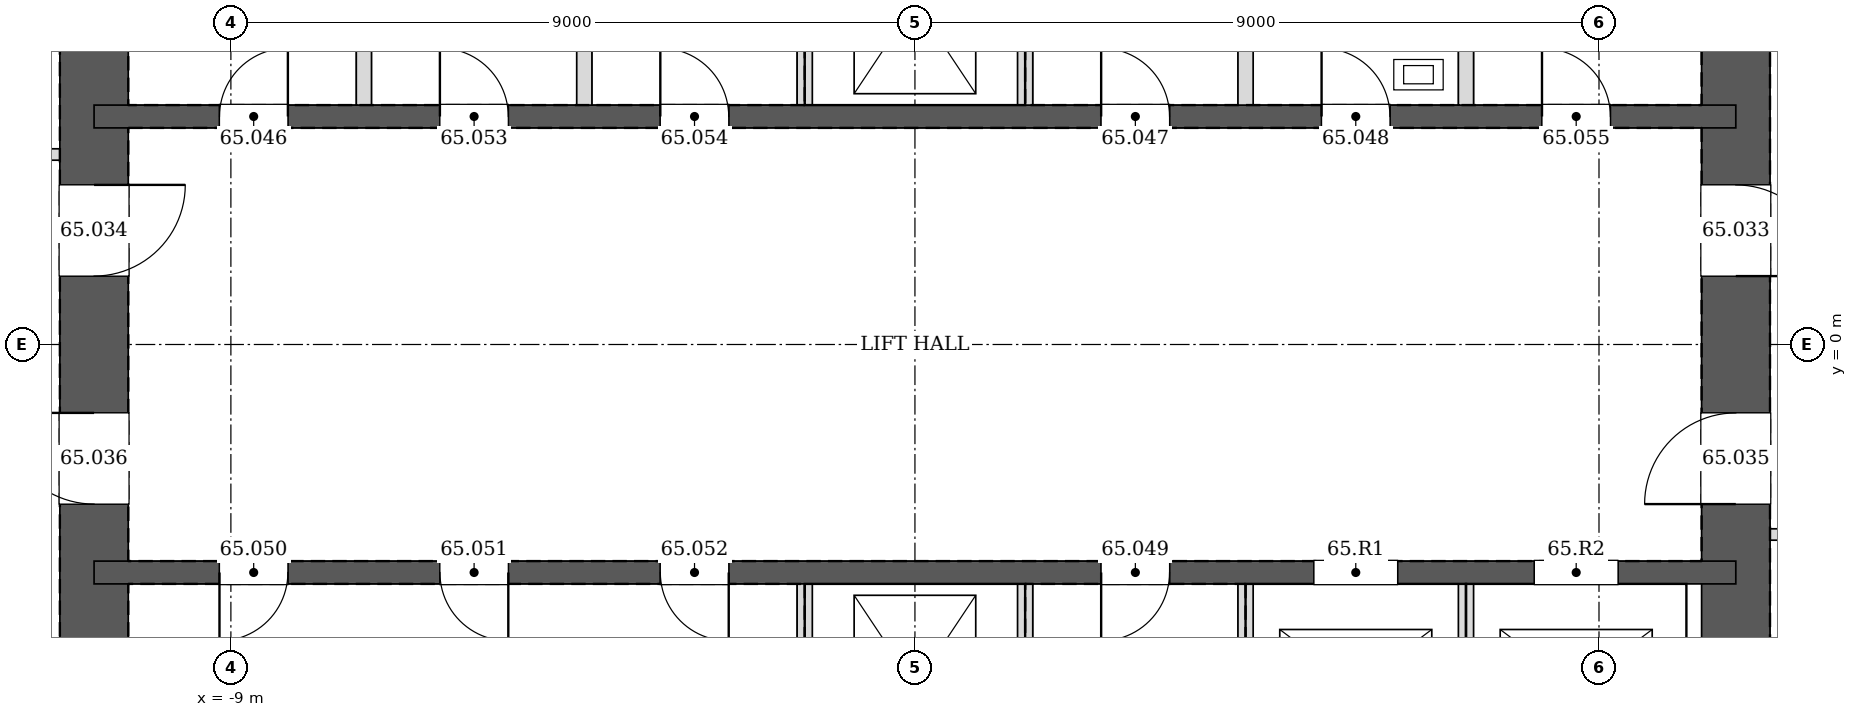
"""IFC4 building model, lengths in metres.
Left out: names, types, materials, properties, quantities, classifications, styles, units other than length and angle.
Written with IfcOpenShell. Run it as: python <this file> out.ifc"""

import sys

from ifc_helpers import new_model, si_unit, direction, frame, frame_2d, origin, place, context, subcontext, project, spatial, rectangle, extrude, element, fill, save


model = new_model("IFC4")
c1 = context("Model", 3, precision=1e-05, world=origin(), true_north=direction((0.0, 1.0)))
c2 = subcontext(c1, "Body", "Model", "MODEL_VIEW")
j1 = project(units=[si_unit("LENGTHUNIT", "METRE"), si_unit("PLANEANGLEUNIT", "RADIAN")], contexts=[c1])
p1 = place(None, origin())
s1 = spatial("IfcSite", under=j1, at=p1, CompositionType="ELEMENT")
p2 = place(p1, origin())
s2 = spatial("IfcBuilding", under=s1, at=p2, CompositionType="ELEMENT")
p3 = place(p2, frame((0.0, 0.0, 270.8)))
s3 = spatial("IfcBuildingStorey", under=s2, at=p3, CompositionType="ELEMENT", Elevation=270.8)
p4 = place(p3, frame((10.8, -10.8, 0.0), z_axis=(0.0, 0.0, 1.0), x_axis=(0.0, 1.0, 0.0)))
e1 = element("IfcWall", 1, at=p4, inside=s3, PredefinedType="SOLIDWALL", context=c2, shape_type="SweptSolid", body=[
    extrude(rectangle(XDim=21.6, YDim=0.9, at=frame_2d((10.8, 0.0))), origin(), (0.0, 0.0, 1.0), 3.4),
])
p5 = place(p4, frame((11.7, 0.0, 0.0)))
e2 = element("IfcOpeningElement", 2, at=p5, cuts=e1, PredefinedType="OPENING", context=c2, shape_type="SweptSolid", body=[
    extrude(rectangle(XDim=1.2, YDim=2.1, at=frame_2d((0.6, 1.05))), frame((0.0, 0.46, 0.0), z_axis=(0.0, -1.0, 0.0), x_axis=(1.0, 0.0, 0.0)), (0.0, 0.0, 1.0), 0.92),
])
p6 = place(p4, frame((8.7, 0.0, 0.0)))
e3 = element("IfcOpeningElement", 3, at=p6, cuts=e1, PredefinedType="OPENING", context=c2, shape_type="SweptSolid", body=[
    extrude(rectangle(XDim=1.2, YDim=2.1, at=frame_2d((0.6, 1.05))), frame((0.0, 0.46, 0.0), z_axis=(0.0, -1.0, 0.0), x_axis=(1.0, 0.0, 0.0)), (0.0, 0.0, 1.0), 0.92),
])
p7 = place(p3, frame((-10.8, 10.8, 0.0), z_axis=(0.0, 0.0, 1.0), x_axis=(0.0, -1.0, 0.0)))
e4 = element("IfcWall", 4, at=p7, inside=s3, PredefinedType="SOLIDWALL", context=c2, shape_type="SweptSolid", body=[
    extrude(rectangle(XDim=21.6, YDim=0.9, at=frame_2d((10.8, 0.0))), origin(), (0.0, 0.0, 1.0), 3.4),
])
p8 = place(p7, frame((8.7, 0.0, 0.0)))
e5 = element("IfcOpeningElement", 5, at=p8, cuts=e4, PredefinedType="OPENING", context=c2, shape_type="SweptSolid", body=[
    extrude(rectangle(XDim=1.2, YDim=2.1, at=frame_2d((0.6, 1.05))), frame((0.0, 0.46, 0.0), z_axis=(0.0, -1.0, 0.0), x_axis=(1.0, 0.0, 0.0)), (0.0, 0.0, 1.0), 0.92),
])
p9 = place(p7, frame((11.7, 0.0, 0.0)))
e6 = element("IfcOpeningElement", 6, at=p9, cuts=e4, PredefinedType="OPENING", context=c2, shape_type="SweptSolid", body=[
    extrude(rectangle(XDim=1.2, YDim=2.1, at=frame_2d((0.6, 1.05))), frame((0.0, 0.46, 0.0), z_axis=(0.0, -1.0, 0.0), x_axis=(1.0, 0.0, 0.0)), (0.0, 0.0, 1.0), 0.92),
])
p10 = place(p3, frame((-10.8, 3.0, 0.0), z_axis=(0.0, 0.0, 1.0), x_axis=(1.0, 0.0, 0.0)))
e7 = element("IfcWall", 7, at=p10, inside=s3, PredefinedType="SOLIDWALL", context=c2, shape_type="SweptSolid", body=[
    extrude(rectangle(XDim=21.6, YDim=0.3, at=frame_2d((10.8, 0.0))), origin(), (0.0, 0.0, 1.0), 3.4),
])
p11 = place(p10, frame((1.65, 0.0, 0.0)))
e8 = element("IfcOpeningElement", 8, at=p11, cuts=e7, PredefinedType="OPENING", context=c2, shape_type="SweptSolid", body=[
    extrude(rectangle(XDim=0.9, YDim=2.1, at=frame_2d((0.45, 1.05))), frame((0.0, 0.16, 0.0), z_axis=(0.0, -1.0, 0.0), x_axis=(1.0, 0.0, 0.0)), (0.0, 0.0, 1.0), 0.32),
])
p12 = place(p10, frame((13.25, 0.0, 0.0)))
e9 = element("IfcOpeningElement", 9, at=p12, cuts=e7, PredefinedType="OPENING", context=c2, shape_type="SweptSolid", body=[
    extrude(rectangle(XDim=0.9, YDim=2.1, at=frame_2d((0.45, 1.05))), frame((0.0, 0.16, 0.0), z_axis=(0.0, -1.0, 0.0), x_axis=(1.0, 0.0, 0.0)), (0.0, 0.0, 1.0), 0.32),
])
p13 = place(p10, frame((16.15, 0.0, 0.0)))
e10 = element("IfcOpeningElement", 10, at=p13, cuts=e7, PredefinedType="OPENING", context=c2, shape_type="SweptSolid", body=[
    extrude(rectangle(XDim=0.9, YDim=2.1, at=frame_2d((0.45, 1.05))), frame((0.0, 0.16, 0.0), z_axis=(0.0, -1.0, 0.0), x_axis=(1.0, 0.0, 0.0)), (0.0, 0.0, 1.0), 0.32),
])
p14 = place(p10, frame((4.55, 0.0, 0.0)))
e11 = element("IfcOpeningElement", 11, at=p14, cuts=e7, PredefinedType="OPENING", context=c2, shape_type="SweptSolid", body=[
    extrude(rectangle(XDim=0.9, YDim=2.1, at=frame_2d((0.45, 1.05))), frame((0.0, 0.16, 0.0), z_axis=(0.0, -1.0, 0.0), x_axis=(1.0, 0.0, 0.0)), (0.0, 0.0, 1.0), 0.32),
])
p15 = place(p10, frame((7.45, 0.0, 0.0)))
e12 = element("IfcOpeningElement", 12, at=p15, cuts=e7, PredefinedType="OPENING", context=c2, shape_type="SweptSolid", body=[
    extrude(rectangle(XDim=0.9, YDim=2.1, at=frame_2d((0.45, 1.05))), frame((0.0, 0.16, 0.0), z_axis=(0.0, -1.0, 0.0), x_axis=(1.0, 0.0, 0.0)), (0.0, 0.0, 1.0), 0.32),
])
p16 = place(p10, frame((19.05, 0.0, 0.0)))
e13 = element("IfcOpeningElement", 13, at=p16, cuts=e7, PredefinedType="OPENING", context=c2, shape_type="SweptSolid", body=[
    extrude(rectangle(XDim=0.9, YDim=2.1, at=frame_2d((0.45, 1.05))), frame((0.0, 0.16, 0.0), z_axis=(0.0, -1.0, 0.0), x_axis=(1.0, 0.0, 0.0)), (0.0, 0.0, 1.0), 0.32),
])
p17 = place(p3, frame((-10.8, -3.0, 0.0), z_axis=(0.0, 0.0, 1.0), x_axis=(1.0, 0.0, 0.0)))
e14 = element("IfcWall", 14, at=p17, inside=s3, PredefinedType="SOLIDWALL", context=c2, shape_type="SweptSolid", body=[
    extrude(rectangle(XDim=21.6, YDim=0.3, at=frame_2d((10.8, 0.0))), origin(), (0.0, 0.0, 1.0), 3.4),
])
p18 = place(p17, frame((13.25, 0.0, 0.0)))
e15 = element("IfcOpeningElement", 15, at=p18, cuts=e14, PredefinedType="OPENING", context=c2, shape_type="SweptSolid", body=[
    extrude(rectangle(XDim=0.9, YDim=2.1, at=frame_2d((0.45, 1.05))), frame((0.0, 0.16, 0.0), z_axis=(0.0, -1.0, 0.0), x_axis=(1.0, 0.0, 0.0)), (0.0, 0.0, 1.0), 0.32),
])
p19 = place(p17, frame((1.65, 0.0, 0.0)))
e16 = element("IfcOpeningElement", 16, at=p19, cuts=e14, PredefinedType="OPENING", context=c2, shape_type="SweptSolid", body=[
    extrude(rectangle(XDim=0.9, YDim=2.1, at=frame_2d((0.45, 1.05))), frame((0.0, 0.16, 0.0), z_axis=(0.0, -1.0, 0.0), x_axis=(1.0, 0.0, 0.0)), (0.0, 0.0, 1.0), 0.32),
])
p20 = place(p17, frame((4.55, 0.0, 0.0)))
e17 = element("IfcOpeningElement", 17, at=p20, cuts=e14, PredefinedType="OPENING", context=c2, shape_type="SweptSolid", body=[
    extrude(rectangle(XDim=0.9, YDim=2.1, at=frame_2d((0.45, 1.05))), frame((0.0, 0.16, 0.0), z_axis=(0.0, -1.0, 0.0), x_axis=(1.0, 0.0, 0.0)), (0.0, 0.0, 1.0), 0.32),
])
p21 = place(p17, frame((7.45, 0.0, 0.0)))
e18 = element("IfcOpeningElement", 18, at=p21, cuts=e14, PredefinedType="OPENING", context=c2, shape_type="SweptSolid", body=[
    extrude(rectangle(XDim=0.9, YDim=2.1, at=frame_2d((0.45, 1.05))), frame((0.0, 0.16, 0.0), z_axis=(0.0, -1.0, 0.0), x_axis=(1.0, 0.0, 0.0)), (0.0, 0.0, 1.0), 0.32),
])
p22 = place(p17, frame((16.05, 0.0, 0.0)))
e19 = element("IfcOpeningElement", 19, at=p22, cuts=e14, PredefinedType="OPENING", context=c2, shape_type="SweptSolid", body=[
    extrude(rectangle(XDim=1.1, YDim=2.1, at=frame_2d((0.55, 1.05))), frame((0.0, 0.16, 0.0), z_axis=(0.0, -1.0, 0.0), x_axis=(1.0, 0.0, 0.0)), (0.0, 0.0, 1.0), 0.32),
])
p23 = place(p17, frame((18.95, 0.0, 0.0)))
e20 = element("IfcOpeningElement", 20, at=p23, cuts=e14, PredefinedType="OPENING", context=c2, shape_type="SweptSolid", body=[
    extrude(rectangle(XDim=1.1, YDim=2.1, at=frame_2d((0.55, 1.05))), frame((0.0, 0.16, 0.0), z_axis=(0.0, -1.0, 0.0), x_axis=(1.0, 0.0, 0.0)), (0.0, 0.0, 1.0), 0.32),
])
p24 = place(p3, frame((11.25, -2.5, 0.0), z_axis=(0.0, 0.0, 1.0), x_axis=(1.0, 0.0, 0.0)))
e21 = element("IfcWall", 21, at=p24, inside=s3, PredefinedType="PARTITIONING", context=c2, shape_type="SweptSolid", body=[
    extrude(rectangle(XDim=1.8, YDim=0.15, at=frame_2d((0.9, 0.0))), origin(), (0.0, 0.0, 1.0), 3.2),
])
p25 = place(p24, frame((0.425, 0.0, 0.0)))
e22 = element("IfcOpeningElement", 22, at=p25, cuts=e21, PredefinedType="OPENING", context=c2, shape_type="SweptSolid", body=[
    extrude(rectangle(XDim=0.95, YDim=2.1, at=frame_2d((0.475, 1.05))), frame((0.0, 0.085, 0.0), z_axis=(0.0, -1.0, 0.0), x_axis=(1.0, 0.0, 0.0)), (0.0, 0.0, 1.0), 0.17),
])
p26 = place(p3, frame((-11.25, 2.5, 0.0), z_axis=(0.0, 0.0, 1.0), x_axis=(-1.0, 0.0, 0.0)))
e23 = element("IfcWall", 23, at=p26, inside=s3, PredefinedType="PARTITIONING", context=c2, shape_type="SweptSolid", body=[
    extrude(rectangle(XDim=1.8, YDim=0.15, at=frame_2d((0.9, 0.0))), origin(), (0.0, 0.0, 1.0), 3.2),
])
p27 = place(p26, frame((0.425, 0.0, 0.0)))
e24 = element("IfcOpeningElement", 24, at=p27, cuts=e23, PredefinedType="OPENING", context=c2, shape_type="SweptSolid", body=[
    extrude(rectangle(XDim=0.95, YDim=2.1, at=frame_2d((0.475, 1.05))), frame((0.0, 0.085, 0.0), z_axis=(0.0, -1.0, 0.0), x_axis=(1.0, 0.0, 0.0)), (0.0, 0.0, 1.0), 0.17),
])
for number, where, z_axis, x_axis in (
    (25, (-7.25, 3.15, 0.0), (0.0, 0.0, 1.0), (0.0, 1.0, 0.0)),
    (26, (-4.35, 3.15, 0.0), (0.0, 0.0, 1.0), (0.0, 1.0, 0.0)),
    (27, (-1.45, 3.15, 0.0), (0.0, 0.0, 1.0), (0.0, 1.0, 0.0)),
    (28, (1.45, 3.15, 0.0), (0.0, 0.0, 1.0), (0.0, 1.0, 0.0)),
    (29, (4.35, 3.15, 0.0), (0.0, 0.0, 1.0), (0.0, 1.0, 0.0)),
    (30, (7.25, 3.15, 0.0), (0.0, 0.0, 1.0), (0.0, 1.0, 0.0)),
    (31, (-1.45, -5.85, 0.0), (0.0, 0.0, 1.0), (0.0, 1.0, 0.0)),
    (32, (1.45, -5.85, 0.0), (0.0, 0.0, 1.0), (0.0, 1.0, 0.0)),
    (33, (4.35, -5.85, 0.0), (0.0, 0.0, 1.0), (0.0, 1.0, 0.0)),
):
    element("IfcWall", number, at=place(p3, frame(where, z_axis=z_axis, x_axis=x_axis)), inside=s3, PredefinedType="PARTITIONING", context=c2, shape_type="SweptSolid", body=[
        extrude(rectangle(XDim=2.7, YDim=0.2, at=frame_2d((1.35, 0.0))), origin(), (0.0, 0.0, 1.0), 3.2),
    ])
p28 = place(p3, frame((7.25, -5.85, 0.0), z_axis=(0.0, 0.0, 1.0), x_axis=(0.0, 1.0, 0.0)))
e34 = element("IfcWall", 34, at=p28, inside=s3, PredefinedType="PARTITIONING", context=c2, shape_type="SweptSolid", body=[
    extrude(rectangle(XDim=2.7, YDim=0.2, at=frame_2d((1.35, 0.0))), origin(), (0.0, 0.0, 1.0), 3.4),
])
p29 = place(p5, frame((1.2, 0.0, 0.0), z_axis=(0.0, 0.0, 1.0), x_axis=(-1.0, 0.0, 0.0)))
e35 = element("IfcDoor", 35, at=p29, inside=s3, OperationType="SINGLE_SWING_RIGHT", PredefinedType="DOOR", context=c2, shape_type="SweptSolid", body=[
    extrude(rectangle(XDim=1.2, YDim=2.1, at=frame_2d((0.6, 1.05))), frame((0.0, 0.025, 0.0), z_axis=(0.0, -1.0, 0.0), x_axis=(1.0, 0.0, 0.0)), (0.0, 0.0, 1.0), 0.05),
])
fill(e2, e35)
p30 = place(p8, origin())
e36 = element("IfcDoor", 36, at=p30, inside=s3, OperationType="SINGLE_SWING_LEFT", PredefinedType="DOOR", context=c2, shape_type="SweptSolid", body=[
    extrude(rectangle(XDim=1.2, YDim=2.1, at=frame_2d((0.6, 1.05))), frame((0.0, 0.025, 0.0), z_axis=(0.0, -1.0, 0.0), x_axis=(1.0, 0.0, 0.0)), (0.0, 0.0, 1.0), 0.05),
])
fill(e5, e36)
p31 = place(p6, origin())
e37 = element("IfcDoor", 37, at=p31, inside=s3, OperationType="SINGLE_SWING_LEFT", PredefinedType="DOOR", context=c2, shape_type="SweptSolid", body=[
    extrude(rectangle(XDim=1.2, YDim=2.1, at=frame_2d((0.6, 1.05))), frame((0.0, 0.025, 0.0), z_axis=(0.0, -1.0, 0.0), x_axis=(1.0, 0.0, 0.0)), (0.0, 0.0, 1.0), 0.05),
])
fill(e3, e37)
p32 = place(p9, frame((1.2, 0.0, 0.0), z_axis=(0.0, 0.0, 1.0), x_axis=(-1.0, 0.0, 0.0)))
e38 = element("IfcDoor", 38, at=p32, inside=s3, OperationType="SINGLE_SWING_RIGHT", PredefinedType="DOOR", context=c2, shape_type="SweptSolid", body=[
    extrude(rectangle(XDim=1.2, YDim=2.1, at=frame_2d((0.6, 1.05))), frame((0.0, 0.025, 0.0), z_axis=(0.0, -1.0, 0.0), x_axis=(1.0, 0.0, 0.0)), (0.0, 0.0, 1.0), 0.05),
])
fill(e6, e38)
p33 = place(p11, origin())
e39 = element("IfcDoor", 39, at=p33, inside=s3, OperationType="SINGLE_SWING_RIGHT", PredefinedType="DOOR", context=c2, shape_type="SweptSolid", body=[
    extrude(rectangle(XDim=0.9, YDim=2.1, at=frame_2d((0.45, 1.05))), frame((0.0, 0.025, 0.0), z_axis=(0.0, -1.0, 0.0), x_axis=(1.0, 0.0, 0.0)), (0.0, 0.0, 1.0), 0.05),
])
fill(e8, e39)
p34 = place(p12, origin())
e40 = element("IfcDoor", 40, at=p34, inside=s3, OperationType="SINGLE_SWING_LEFT", PredefinedType="DOOR", context=c2, shape_type="SweptSolid", body=[
    extrude(rectangle(XDim=0.9, YDim=2.1, at=frame_2d((0.45, 1.05))), frame((0.0, 0.025, 0.0), z_axis=(0.0, -1.0, 0.0), x_axis=(1.0, 0.0, 0.0)), (0.0, 0.0, 1.0), 0.05),
])
fill(e9, e40)
p35 = place(p13, origin())
e41 = element("IfcDoor", 41, at=p35, inside=s3, OperationType="SINGLE_SWING_LEFT", PredefinedType="DOOR", context=c2, shape_type="SweptSolid", body=[
    extrude(rectangle(XDim=0.9, YDim=2.1, at=frame_2d((0.45, 1.05))), frame((0.0, 0.025, 0.0), z_axis=(0.0, -1.0, 0.0), x_axis=(1.0, 0.0, 0.0)), (0.0, 0.0, 1.0), 0.05),
])
fill(e10, e41)
p36 = place(p18, frame((0.9, 0.0, 0.0), z_axis=(0.0, 0.0, 1.0), x_axis=(-1.0, 0.0, 0.0)))
e42 = element("IfcDoor", 42, at=p36, inside=s3, OperationType="SINGLE_SWING_RIGHT", PredefinedType="DOOR", context=c2, shape_type="SweptSolid", body=[
    extrude(rectangle(XDim=0.9, YDim=2.1, at=frame_2d((0.45, 1.05))), frame((0.0, 0.025, 0.0), z_axis=(0.0, -1.0, 0.0), x_axis=(1.0, 0.0, 0.0)), (0.0, 0.0, 1.0), 0.05),
])
fill(e15, e42)
p37 = place(p19, frame((0.9, 0.0, 0.0), z_axis=(0.0, 0.0, 1.0), x_axis=(-1.0, 0.0, 0.0)))
e43 = element("IfcDoor", 43, at=p37, inside=s3, OperationType="SINGLE_SWING_RIGHT", PredefinedType="DOOR", context=c2, shape_type="SweptSolid", body=[
    extrude(rectangle(XDim=0.9, YDim=2.1, at=frame_2d((0.45, 1.05))), frame((0.0, 0.025, 0.0), z_axis=(0.0, -1.0, 0.0), x_axis=(1.0, 0.0, 0.0)), (0.0, 0.0, 1.0), 0.05),
])
fill(e16, e43)
p38 = place(p20, frame((0.9, 0.0, 0.0), z_axis=(0.0, 0.0, 1.0), x_axis=(-1.0, 0.0, 0.0)))
e44 = element("IfcDoor", 44, at=p38, inside=s3, OperationType="SINGLE_SWING_LEFT", PredefinedType="DOOR", context=c2, shape_type="SweptSolid", body=[
    extrude(rectangle(XDim=0.9, YDim=2.1, at=frame_2d((0.45, 1.05))), frame((0.0, 0.025, 0.0), z_axis=(0.0, -1.0, 0.0), x_axis=(1.0, 0.0, 0.0)), (0.0, 0.0, 1.0), 0.05),
])
fill(e17, e44)
p39 = place(p21, frame((0.9, 0.0, 0.0), z_axis=(0.0, 0.0, 1.0), x_axis=(-1.0, 0.0, 0.0)))
e45 = element("IfcDoor", 45, at=p39, inside=s3, OperationType="SINGLE_SWING_LEFT", PredefinedType="DOOR", context=c2, shape_type="SweptSolid", body=[
    extrude(rectangle(XDim=0.9, YDim=2.1, at=frame_2d((0.45, 1.05))), frame((0.0, 0.025, 0.0), z_axis=(0.0, -1.0, 0.0), x_axis=(1.0, 0.0, 0.0)), (0.0, 0.0, 1.0), 0.05),
])
fill(e18, e45)
p40 = place(p14, origin())
e46 = element("IfcDoor", 46, at=p40, inside=s3, OperationType="SINGLE_SWING_LEFT", PredefinedType="DOOR", context=c2, shape_type="SweptSolid", body=[
    extrude(rectangle(XDim=0.9, YDim=2.1, at=frame_2d((0.45, 1.05))), frame((0.0, 0.025, 0.0), z_axis=(0.0, -1.0, 0.0), x_axis=(1.0, 0.0, 0.0)), (0.0, 0.0, 1.0), 0.05),
])
fill(e11, e46)
p41 = place(p15, origin())
e47 = element("IfcDoor", 47, at=p41, inside=s3, OperationType="SINGLE_SWING_LEFT", PredefinedType="DOOR", context=c2, shape_type="SweptSolid", body=[
    extrude(rectangle(XDim=0.9, YDim=2.1, at=frame_2d((0.45, 1.05))), frame((0.0, 0.025, 0.0), z_axis=(0.0, -1.0, 0.0), x_axis=(1.0, 0.0, 0.0)), (0.0, 0.0, 1.0), 0.05),
])
fill(e12, e47)
p42 = place(p16, origin())
e48 = element("IfcDoor", 48, at=p42, inside=s3, OperationType="SINGLE_SWING_LEFT", PredefinedType="DOOR", context=c2, shape_type="SweptSolid", body=[
    extrude(rectangle(XDim=0.9, YDim=2.1, at=frame_2d((0.45, 1.05))), frame((0.0, 0.025, 0.0), z_axis=(0.0, -1.0, 0.0), x_axis=(1.0, 0.0, 0.0)), (0.0, 0.0, 1.0), 0.05),
])
fill(e13, e48)
p43 = place(p22, origin())
e49 = element("IfcDoor", 49, at=p43, inside=s3, OperationType="DOUBLE_DOOR_SLIDING", PredefinedType="DOOR", context=c2, shape_type="SweptSolid", body=[
    extrude(rectangle(XDim=1.1, YDim=2.1, at=frame_2d((0.55, 1.05))), frame((0.0, 0.025, 0.0), z_axis=(0.0, -1.0, 0.0), x_axis=(1.0, 0.0, 0.0)), (0.0, 0.0, 1.0), 0.05),
])
fill(e19, e49)
p44 = place(p23, origin())
e50 = element("IfcDoor", 50, at=p44, inside=s3, OperationType="DOUBLE_DOOR_SLIDING", PredefinedType="DOOR", context=c2, shape_type="SweptSolid", body=[
    extrude(rectangle(XDim=1.1, YDim=2.1, at=frame_2d((0.55, 1.05))), frame((0.0, 0.025, 0.0), z_axis=(0.0, -1.0, 0.0), x_axis=(1.0, 0.0, 0.0)), (0.0, 0.0, 1.0), 0.05),
])
fill(e20, e50)
save(model, sys.argv[1])
